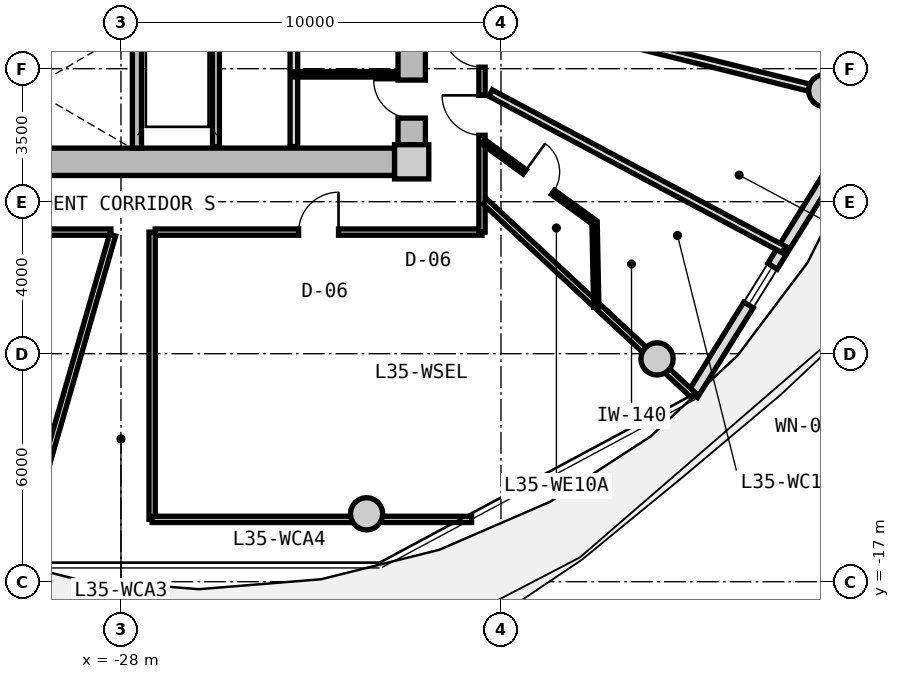
"""IFC4 building model, lengths in metres.
Left out: names, types, materials, properties, quantities, classifications, styles, units other than length and angle.
Written with IfcOpenShell. Run it as: python <this file> out.ifc"""

import sys

from ifc_helpers import new_model, si_unit, direction, frame, frame_2d, origin, origin_2d, place, context, subcontext, project, spatial, rectangle, circle, extrude, source, transform, mapped, element, fill, save


model = new_model("IFC4")
c1 = context("Model", 3, precision=1e-05, world=origin(), true_north=direction((0.0, 1.0)))
c2 = subcontext(c1, "Body", "Model", "MODEL_VIEW")
j1 = project(units=[si_unit("LENGTHUNIT", "METRE"), si_unit("PLANEANGLEUNIT", "RADIAN")], contexts=[c1])
p1 = place(None, origin())
s1 = spatial("IfcSite", under=j1, at=p1, CompositionType="ELEMENT")
p2 = place(p1, origin())
s2 = spatial("IfcBuilding", under=s1, at=p2, CompositionType="ELEMENT")
p3 = place(p2, frame((0.0, 0.0, 114.55)))
s3 = spatial("IfcBuildingStorey", under=s2, at=p3, CompositionType="ELEMENT", Elevation=114.55)
m1 = source(origin(), c2, "Body", "SweptSolid", [
    extrude(rectangle(XDim=0.9, YDim=0.9, at=origin_2d()), origin(), (0.0, 0.0, 1.0), 3.05),
])
p4 = place(p3, frame((-20.35, -5.95, 0.0), z_axis=(0.0, 0.0, 1.0), x_axis=(1.0, 0.0, 0.0)))
e1 = element("IfcColumn", 1, at=p4, inside=s3, PredefinedType="COLUMN", context=c2, shape_type="MappedRepresentation", body=[
    mapped(m1, transform((0.0, 0.0, 0.0), x_axis=(1.0, 0.0, 0.0), y_axis=(0.0, 1.0, 0.0), z_axis=(0.0, 0.0, 1.0), scale=1.0)),
])
m2 = source(origin(), c2, "Body", "SweptSolid", [
    extrude(rectangle(XDim=14.4, YDim=0.72, at=frame_2d((7.2, 0.0))), origin(), (0.0, 0.0, 1.0), 2.79),
])
p5 = place(p3, frame((-20.8, -5.95, 0.0), z_axis=(0.0, 0.0, 1.0), x_axis=(-1.0, 0.0, 0.0)))
e2 = element("IfcWall", 2, at=p5, inside=s3, PredefinedType="SHEAR", context=c2, shape_type="MappedRepresentation", body=[
    mapped(m2, transform((0.0, 0.0, 0.0), x_axis=(1.0, 0.0, 0.0), y_axis=(0.0, 1.0, 0.0), z_axis=(0.0, 0.0, 1.0), scale=1.0)),
])
m3 = source(origin(), c2, "Body", "SweptSolid", [
    extrude(rectangle(XDim=11.0, YDim=0.72, at=frame_2d((5.5, 0.0))), origin(), (0.0, 0.0, 1.0), 2.79),
])
p6 = place(p3, frame((-20.35, 5.5, 0.0), z_axis=(0.0, 0.0, 1.0), x_axis=(0.0, -1.0, 0.0)))
e3 = element("IfcWall", 3, at=p6, inside=s3, PredefinedType="SHEAR", context=c2, shape_type="MappedRepresentation", body=[
    mapped(m3, transform((0.0, 0.0, 0.0), x_axis=(1.0, 0.0, 0.0), y_axis=(0.0, 1.0, 0.0), z_axis=(0.0, 0.0, 1.0), scale=1.0)),
])
p7 = place(p6, frame((5.65, 0.0, 0.0)))
e4 = element("IfcOpeningElement", 4, at=p7, cuts=e3, PredefinedType="OPENING", context=c2, shape_type="SweptSolid", body=[
    extrude(rectangle(XDim=1.2, YDim=2.15, at=frame_2d((0.6, 1.075))), frame((0.0, 0.37, 0.0), z_axis=(0.0, -1.0, 0.0), x_axis=(1.0, 0.0, 0.0)), (0.0, 0.0, 1.0), 0.74),
])
p8 = place(p6, frame((9.3, 0.0, 0.0)))
e5 = element("IfcOpeningElement", 5, at=p8, cuts=e3, PredefinedType="OPENING", context=c2, shape_type="SweptSolid", body=[
    extrude(rectangle(XDim=1.0, YDim=2.1, at=frame_2d((0.5, 1.05))), frame((0.0, 0.37, 0.0), z_axis=(0.0, -1.0, 0.0), x_axis=(1.0, 0.0, 0.0)), (0.0, 0.0, 1.0), 0.74),
])
m4 = source(origin(), c2, "Body", "SweptSolid", [
    extrude(circle(Radius=0.425, at=origin_2d()), origin(), (0.0, 0.0, 1.0), 3.05),
])
for number, where, z_axis, x_axis in (
    (6, (-21.537, -15.213, 0.0), (0.0, 0.0, 1.0), (1.0, 0.0, 0.0)),
    (7, (-13.894, -11.137, 0.0), (0.0, 0.0, 1.0), (1.0, 0.0, 0.0)),
    (8, (-9.481, -4.076, 0.0), (0.0, 0.0, 1.0), (1.0, 0.0, 0.0)),
):
    element("IfcColumn", number, at=place(p3, frame(where, z_axis=z_axis, x_axis=x_axis)), inside=s3, PredefinedType="COLUMN", context=c2, shape_type="MappedRepresentation", body=[
        mapped(m4, transform((0.0, 0.0, 0.0), x_axis=(1.0, 0.0, 0.0), y_axis=(0.0, 1.0, 0.0), z_axis=(0.0, 0.0, 1.0), scale=1.0)),
    ])
m5 = source(origin(), c2, "Body", "SweptSolid", [
    extrude(rectangle(XDim=9.014, YDim=0.29, at=frame_2d((4.507, 0.0))), origin(), (0.0, 0.0, 1.0), 2.79),
])
p9 = place(p3, frame((-8.196, -4.421, 0.0), z_axis=(0.0, 0.0, 1.0), x_axis=(-0.527732945084, -0.849410347637, 0.0)))
e9 = element("IfcWall", 9, at=p9, inside=s3, PredefinedType="SOLIDWALL", context=c2, shape_type="MappedRepresentation", body=[
    mapped(m5, transform((0.0, 0.0, 0.0), x_axis=(1.0, 0.0, 0.0), y_axis=(0.0, 1.0, 0.0), z_axis=(0.0, 0.0, 1.0), scale=1.0)),
])
p10 = place(p9, frame((0.98, 0.0, 0.0)))
e10 = element("IfcOpeningElement", 10, at=p10, cuts=e9, PredefinedType="OPENING", context=c2, shape_type="SweptSolid", body=[
    extrude(rectangle(XDim=1.15, YDim=2.25, at=frame_2d((0.575, 1.125))), frame((0.0, 0.155, 0.0), z_axis=(0.0, -1.0, 0.0), x_axis=(1.0, 0.0, 0.0)), (0.0, 0.0, 1.0), 0.31),
])
p11 = place(p9, frame((5.037, 0.0, 0.85)))
e11 = element("IfcOpeningElement", 11, at=p11, cuts=e9, PredefinedType="OPENING", context=c2, shape_type="SweptSolid", body=[
    extrude(rectangle(XDim=1.2, YDim=1.5, at=frame_2d((0.6, 0.75))), frame((0.0, 0.155, 0.0), z_axis=(0.0, -1.0, 0.0), x_axis=(1.0, 0.0, 0.0)), (0.0, 0.0, 1.0), 0.31),
])
m6 = source(origin(), c2, "Body", "SweptSolid", [
    extrude(rectangle(XDim=3.14, YDim=0.24, at=frame_2d((1.57, 0.0))), origin(), (0.0, 0.0, 1.0), 2.79),
])
p12 = place(p3, frame((-27.58, -5.59, 0.0), z_axis=(0.0, 0.0, 1.0), x_axis=(0.0, 1.0, 0.0)))
e12 = element("IfcWall", 12, at=p12, inside=s3, PredefinedType="PARTITIONING", context=c2, shape_type="MappedRepresentation", body=[
    mapped(m6, transform((0.0, 0.0, 0.0), x_axis=(1.0, 0.0, 0.0), y_axis=(0.0, 1.0, 0.0), z_axis=(0.0, 0.0, 1.0), scale=1.0)),
])
m7 = source(origin(), c2, "Body", "SweptSolid", [
    extrude(rectangle(XDim=3.8, YDim=0.2, at=frame_2d((1.9, 0.0))), origin(), (0.0, 0.0, 1.0), 2.775),
])
p13 = place(p3, frame((-23.45, -5.55, 0.0), z_axis=(0.0, 0.0, 1.0), x_axis=(0.0, 1.0, 0.0)))
e13 = element("IfcWall", 13, at=p13, inside=s3, PredefinedType="PARTITIONING", context=c2, shape_type="MappedRepresentation", body=[
    mapped(m7, transform((0.0, 0.0, 0.0), x_axis=(1.0, 0.0, 0.0), y_axis=(0.0, 1.0, 0.0), z_axis=(0.0, 0.0, 1.0), scale=1.0)),
])
m8 = source(origin(), c2, "Body", "SweptSolid", [
    extrude(rectangle(XDim=3.22, YDim=0.18, at=frame_2d((1.61, 0.0))), origin(), (0.0, 0.0, 1.0), 2.775),
])
p14 = place(p3, frame((-25.5, -5.55, 0.0), z_axis=(0.0, 0.0, 1.0), x_axis=(0.0, 1.0, 0.0)))
e14 = element("IfcWall", 14, at=p14, inside=s3, PredefinedType="PARTITIONING", context=c2, shape_type="MappedRepresentation", body=[
    mapped(m8, transform((0.0, 0.0, 0.0), x_axis=(1.0, 0.0, 0.0), y_axis=(0.0, 1.0, 0.0), z_axis=(0.0, 0.0, 1.0), scale=1.0)),
])
m9 = source(origin(), c2, "Body", "SweptSolid", [
    extrude(rectangle(XDim=2.7, YDim=0.14, at=frame_2d((1.35, 0.0))), origin(), (0.0, 0.0, 1.0), 2.775),
])
p15 = place(p3, frame((-23.45, -3.65, 0.0), z_axis=(0.0, 0.0, 1.0), x_axis=(1.0, 0.0, 0.0)))
e15 = element("IfcWall", 15, at=p15, inside=s3, PredefinedType="PARTITIONING", context=c2, shape_type="MappedRepresentation", body=[
    mapped(m9, transform((0.0, 0.0, 0.0), x_axis=(1.0, 0.0, 0.0), y_axis=(0.0, 1.0, 0.0), z_axis=(0.0, 0.0, 1.0), scale=1.0)),
])
m10 = source(origin(), c2, "Body", "SweptSolid", [
    extrude(rectangle(XDim=8.6, YDim=0.165, at=frame_2d((4.3, 0.0))), origin(), (0.0, 0.0, 1.0), 2.775),
])
p16 = place(p3, frame((-18.5, -7.8, 0.0), z_axis=(0.0, 0.0, 1.0), x_axis=(-1.0, 0.0, 0.0)))
e16 = element("IfcWall", 16, at=p16, inside=s3, PredefinedType="PARTITIONING", context=c2, shape_type="MappedRepresentation", body=[
    mapped(m10, transform((0.0, 0.0, 0.0), x_axis=(1.0, 0.0, 0.0), y_axis=(0.0, 1.0, 0.0), z_axis=(0.0, 0.0, 1.0), scale=1.0)),
])
p17 = place(p16, frame((3.775, 0.0, 0.0)))
e17 = element("IfcOpeningElement", 17, at=p17, cuts=e16, PredefinedType="OPENING", context=c2, shape_type="SweptSolid", body=[
    extrude(rectangle(XDim=1.05, YDim=2.15, at=frame_2d((0.525, 1.075))), frame((0.0, 0.093, 0.0), z_axis=(0.0, -1.0, 0.0), x_axis=(1.0, 0.0, 0.0)), (0.0, 0.0, 1.0), 0.185),
])
m11 = source(origin(), c2, "Body", "SweptSolid", [
    extrude(rectangle(XDim=9.234, YDim=0.165, at=frame_2d((4.617, 0.0))), origin(), (0.0, 0.0, 1.0), 2.775),
])
p18 = place(p3, frame((-28.266, -7.8, 0.0), z_axis=(0.0, 0.0, 1.0), x_axis=(-1.0, 0.0, 0.0)))
e18 = element("IfcWall", 18, at=p18, inside=s3, PredefinedType="PARTITIONING", context=c2, shape_type="MappedRepresentation", body=[
    mapped(m11, transform((0.0, 0.0, 0.0), x_axis=(1.0, 0.0, 0.0), y_axis=(0.0, 1.0, 0.0), z_axis=(0.0, 0.0, 1.0), scale=1.0)),
])
m12 = source(origin(), c2, "Body", "SweptSolid", [
    extrude(rectangle(XDim=15.6, YDim=0.165, at=frame_2d((7.8, 0.0))), origin(), (0.0, 0.0, 1.0), 2.775),
])
p19 = place(p3, frame((-18.5, 7.8, 0.0), z_axis=(0.0, 0.0, 1.0), x_axis=(0.0, -1.0, 0.0)))
e19 = element("IfcWall", 19, at=p19, inside=s3, PredefinedType="PARTITIONING", context=c2, shape_type="MappedRepresentation", body=[
    mapped(m12, transform((0.0, 0.0, 0.0), x_axis=(1.0, 0.0, 0.0), y_axis=(0.0, 1.0, 0.0), z_axis=(0.0, 0.0, 1.0), scale=1.0)),
])
p20 = place(p19, frame((12.002, 0.0, 0.0)))
e20 = element("IfcOpeningElement", 20, at=p20, cuts=e19, PredefinedType="OPENING", context=c2, shape_type="SweptSolid", body=[
    extrude(rectangle(XDim=1.05, YDim=2.15, at=frame_2d((0.525, 1.075))), frame((0.0, 0.093, 0.0), z_axis=(0.0, -1.0, 0.0), x_axis=(1.0, 0.0, 0.0)), (0.0, 0.0, 1.0), 0.185),
])
p21 = place(p19, frame((10.211, 0.0, 0.0)))
e21 = element("IfcOpeningElement", 21, at=p21, cuts=e19, PredefinedType="OPENING", context=c2, shape_type="SweptSolid", body=[
    extrude(rectangle(XDim=1.05, YDim=2.15, at=frame_2d((0.525, 1.075))), frame((0.0, 0.093, 0.0), z_axis=(0.0, -1.0, 0.0), x_axis=(1.0, 0.0, 0.0)), (0.0, 0.0, 1.0), 0.185),
])
p22 = place(p19, frame((8.212, 0.0, 0.0)))
e22 = element("IfcOpeningElement", 22, at=p22, cuts=e19, PredefinedType="OPENING", context=c2, shape_type="SweptSolid", body=[
    extrude(rectangle(XDim=1.05, YDim=2.15, at=frame_2d((0.525, 1.075))), frame((0.0, 0.093, 0.0), z_axis=(0.0, -1.0, 0.0), x_axis=(1.0, 0.0, 0.0)), (0.0, 0.0, 1.0), 0.185),
])
p23 = place(p19, frame((6.291, 0.0, 0.0)))
e23 = element("IfcOpeningElement", 23, at=p23, cuts=e19, PredefinedType="OPENING", context=c2, shape_type="SweptSolid", body=[
    extrude(rectangle(XDim=1.05, YDim=2.15, at=frame_2d((0.525, 1.075))), frame((0.0, 0.093, 0.0), z_axis=(0.0, -1.0, 0.0), x_axis=(1.0, 0.0, 0.0)), (0.0, 0.0, 1.0), 0.185),
])
p24 = place(p19, frame((4.739, 0.0, 0.0)))
e24 = element("IfcOpeningElement", 24, at=p24, cuts=e19, PredefinedType="OPENING", context=c2, shape_type="SweptSolid", body=[
    extrude(rectangle(XDim=0.92, YDim=2.1, at=frame_2d((0.46, 1.05))), frame((0.0, 0.093, 0.0), z_axis=(0.0, -1.0, 0.0), x_axis=(1.0, 0.0, 0.0)), (0.0, 0.0, 1.0), 0.185),
])
p25 = place(p19, frame((2.096, 0.0, 0.0)))
e25 = element("IfcOpeningElement", 25, at=p25, cuts=e19, PredefinedType="OPENING", context=c2, shape_type="SweptSolid", body=[
    extrude(rectangle(XDim=0.92, YDim=2.1, at=frame_2d((0.46, 1.05))), frame((0.0, 0.093, 0.0), z_axis=(0.0, -1.0, 0.0), x_axis=(1.0, 0.0, 0.0)), (0.0, 0.0, 1.0), 0.185),
])
m13 = source(origin(), c2, "Body", "SweptSolid", [
    extrude(rectangle(XDim=8.989, YDim=0.165, at=frame_2d((4.495, 0.0))), origin(), (0.0, 0.0, 1.0), 2.275),
])
p26 = place(p3, frame((-28.222, -7.88, 0.0), z_axis=(0.0, 0.0, 1.0), x_axis=(-0.27702323008, -0.960863221274, 0.0)))
e26 = element("IfcWall", 26, at=p26, inside=s3, PredefinedType="PARTITIONING", context=c2, shape_type="MappedRepresentation", body=[
    mapped(m13, transform((0.0, 0.0, 0.0), x_axis=(1.0, 0.0, 0.0), y_axis=(0.0, 1.0, 0.0), z_axis=(0.0, 0.0, 1.0), scale=1.0)),
])
m14 = source(origin(), c2, "Body", "SweptSolid", [
    extrude(rectangle(XDim=7.482, YDim=0.165, at=frame_2d((3.741, 0.0))), origin(), (0.0, 0.0, 1.0), 2.275),
])
p27 = place(p3, frame((-18.42, -6.998, 0.0), z_axis=(0.0, 0.0, 1.0), x_axis=(0.732508698043, -0.680757671489, 0.0)))
e27 = element("IfcWall", 27, at=p27, inside=s3, PredefinedType="PARTITIONING", context=c2, shape_type="MappedRepresentation", body=[
    mapped(m14, transform((0.0, 0.0, 0.0), x_axis=(1.0, 0.0, 0.0), y_axis=(0.0, 1.0, 0.0), z_axis=(0.0, 0.0, 1.0), scale=1.0)),
])
m15 = source(origin(), c2, "Body", "SweptSolid", [
    extrude(rectangle(XDim=7.56, YDim=0.165, at=frame_2d((3.78, 0.0))), origin(), (0.0, 0.0, 1.0), 2.775),
])
p28 = place(p3, frame((-27.18, -15.36, 0.0), z_axis=(0.0, 0.0, 1.0), x_axis=(0.0, 1.0, 0.0)))
e28 = element("IfcWall", 28, at=p28, inside=s3, PredefinedType="PARTITIONING", context=c2, shape_type="MappedRepresentation", body=[
    mapped(m15, transform((0.0, 0.0, 0.0), x_axis=(1.0, 0.0, 0.0), y_axis=(0.0, 1.0, 0.0), z_axis=(0.0, 0.0, 1.0), scale=1.0)),
])
m16 = source(origin(), c2, "Body", "SweptSolid", [
    extrude(rectangle(XDim=8.407, YDim=0.165, at=frame_2d((4.204, 0.0))), origin(), (0.0, 0.0, 1.0), 2.275),
])
p29 = place(p3, frame((-27.18, -15.36, 0.0), z_axis=(0.0, 0.0, 1.0), x_axis=(1.0, 0.0, 0.0)))
e29 = element("IfcWall", 29, at=p29, inside=s3, PredefinedType="PARTITIONING", context=c2, shape_type="MappedRepresentation", body=[
    mapped(m16, transform((0.0, 0.0, 0.0), x_axis=(1.0, 0.0, 0.0), y_axis=(0.0, 1.0, 0.0), z_axis=(0.0, 0.0, 1.0), scale=1.0)),
])
m17 = source(origin(), c2, "Body", "SweptSolid", [
    extrude(rectangle(XDim=10.556, YDim=0.19, at=frame_2d((5.278, 0.0))), origin(), (0.0, 0.0, 1.0), 2.275),
])
p30 = place(p3, frame((-18.42, -1.875, 0.0), z_axis=(0.0, 0.0, 1.0), x_axis=(0.970363857851, -0.241648470667, 0.0)))
e30 = element("IfcWall", 30, at=p30, inside=s3, PredefinedType="PARTITIONING", context=c2, shape_type="MappedRepresentation", body=[
    mapped(m17, transform((0.0, 0.0, 0.0), x_axis=(1.0, 0.0, 0.0), y_axis=(0.0, 1.0, 0.0), z_axis=(0.0, 0.0, 1.0), scale=1.0)),
])
m18 = source(origin(), c2, "Body", "SweptSolid", [
    extrude(rectangle(XDim=8.744, YDim=0.19, at=frame_2d((4.372, 0.0))), origin(), (0.0, 0.0, 1.0), 2.775),
])
p31 = place(p3, frame((-18.273, -4.142, 0.0), z_axis=(0.0, 0.0, 1.0), x_axis=(0.882252449936, -0.470776607938, 0.0)))
e31 = element("IfcWall", 31, at=p31, inside=s3, PredefinedType="PARTITIONING", context=c2, shape_type="MappedRepresentation", body=[
    mapped(m18, transform((0.0, 0.0, 0.0), x_axis=(1.0, 0.0, 0.0), y_axis=(0.0, 1.0, 0.0), z_axis=(0.0, 0.0, 1.0), scale=1.0)),
])
m19 = source(origin(), c2, "Body", "SweptSolid", [
    extrude(rectangle(XDim=3.621, YDim=0.14, at=frame_2d((1.811, 0.0))), origin(), (0.0, 0.0, 1.0), 2.775),
])
p32 = place(p3, frame((-18.47, -5.422, 0.0), z_axis=(0.0, 0.0, 1.0), x_axis=(0.80968252222, -0.586868139544, 0.0)))
e32 = element("IfcWall", 32, at=p32, inside=s3, PredefinedType="PARTITIONING", context=c2, shape_type="MappedRepresentation", body=[
    mapped(m19, transform((0.0, 0.0, 0.0), x_axis=(1.0, 0.0, 0.0), y_axis=(0.0, 1.0, 0.0), z_axis=(0.0, 0.0, 1.0), scale=1.0)),
])
p33 = place(p32, frame((1.351, 0.0, 0.0)))
e33 = element("IfcOpeningElement", 33, at=p33, cuts=e32, PredefinedType="OPENING", context=c2, shape_type="SweptSolid", body=[
    extrude(rectangle(XDim=0.92, YDim=2.1, at=frame_2d((0.46, 1.05))), frame((0.0, 0.08, 0.0), z_axis=(0.0, -1.0, 0.0), x_axis=(1.0, 0.0, 0.0)), (0.0, 0.0, 1.0), 0.16),
])
m20 = source(origin(), c2, "Body", "SweptSolid", [
    extrude(rectangle(XDim=2.225, YDim=0.14, at=frame_2d((1.112, 0.0))), origin(), (0.0, 0.0, 1.0), 2.775),
])
p34 = place(p3, frame((-15.538, -7.547, 0.0), z_axis=(0.0, 0.0, 1.0), x_axis=(0.019971869027, -0.999800542332, 0.0)))
e34 = element("IfcWall", 34, at=p34, inside=s3, PredefinedType="PARTITIONING", context=c2, shape_type="MappedRepresentation", body=[
    mapped(m20, transform((0.0, 0.0, 0.0), x_axis=(1.0, 0.0, 0.0), y_axis=(0.0, 1.0, 0.0), z_axis=(0.0, 0.0, 1.0), scale=1.0)),
])
m21 = source(origin(), c2, "Body", "SweptSolid", [
    extrude(rectangle(XDim=1.2, YDim=1.5, at=frame_2d((0.6, 0.75))), frame((0.0, 0.03, 0.0), z_axis=(0.0, -1.0, 0.0), x_axis=(1.0, 0.0, 0.0)), (0.0, 0.0, 1.0), 0.06),
])
p35 = place(p11, origin())
e35 = element("IfcWindow", 35, at=p35, inside=s3, PartitioningType="SINGLE_PANEL", PredefinedType="WINDOW", context=c2, shape_type="MappedRepresentation", body=[
    mapped(m21, transform((0.0, 0.0, 0.0), x_axis=(1.0, 0.0, 0.0), y_axis=(0.0, 1.0, 0.0), z_axis=(0.0, 0.0, 1.0), scale=1.0)),
])
fill(e11, e35)
m22 = source(origin(), c2, "Body", "SweptSolid", [
    extrude(rectangle(XDim=1.0, YDim=2.1, at=frame_2d((0.5, 1.05))), frame((0.0, 0.025, 0.0), z_axis=(0.0, -1.0, 0.0), x_axis=(1.0, 0.0, 0.0)), (0.0, 0.0, 1.0), 0.05),
])
p36 = place(p8, frame((1.0, 0.0, 0.0), z_axis=(0.0, 0.0, 1.0), x_axis=(-1.0, 0.0, 0.0)))
e36 = element("IfcDoor", 36, at=p36, inside=s3, OperationType="SINGLE_SWING_RIGHT", PredefinedType="DOOR", context=c2, shape_type="MappedRepresentation", body=[
    mapped(m22, transform((0.0, 0.0, 0.0), x_axis=(1.0, 0.0, 0.0), y_axis=(0.0, 1.0, 0.0), z_axis=(0.0, 0.0, 1.0), scale=1.0)),
])
fill(e5, e36)
m23 = source(origin(), c2, "Body", "SweptSolid", [
    extrude(rectangle(XDim=1.05, YDim=2.15, at=frame_2d((0.525, 1.075))), frame((0.0, 0.025, 0.0), z_axis=(0.0, -1.0, 0.0), x_axis=(1.0, 0.0, 0.0)), (0.0, 0.0, 1.0), 0.05),
])
p37 = place(p17, frame((1.05, 0.0, 0.0), z_axis=(0.0, 0.0, 1.0), x_axis=(-1.0, 0.0, 0.0)))
e37 = element("IfcDoor", 37, at=p37, inside=s3, OperationType="SINGLE_SWING_RIGHT", PredefinedType="DOOR", context=c2, shape_type="MappedRepresentation", body=[
    mapped(m23, transform((0.0, 0.0, 0.0), x_axis=(1.0, 0.0, 0.0), y_axis=(0.0, 1.0, 0.0), z_axis=(0.0, 0.0, 1.0), scale=1.0)),
])
fill(e17, e37)
p38 = place(p20, frame((1.05, 0.0, 0.0), z_axis=(0.0, 0.0, 1.0), x_axis=(-1.0, 0.0, 0.0)))
e38 = element("IfcDoor", 38, at=p38, inside=s3, OperationType="SINGLE_SWING_RIGHT", PredefinedType="DOOR", context=c2, shape_type="MappedRepresentation", body=[
    mapped(m23, transform((0.0, 0.0, 0.0), x_axis=(1.0, 0.0, 0.0), y_axis=(0.0, 1.0, 0.0), z_axis=(0.0, 0.0, 1.0), scale=1.0)),
])
fill(e20, e38)
m24 = source(origin(), c2, "Body", "SweptSolid", [
    extrude(rectangle(XDim=0.92, YDim=2.1, at=frame_2d((0.46, 1.05))), frame((0.0, 0.025, 0.0), z_axis=(0.0, -1.0, 0.0), x_axis=(1.0, 0.0, 0.0)), (0.0, 0.0, 1.0), 0.05),
])
p39 = place(p33, origin())
e39 = element("IfcDoor", 39, at=p39, inside=s3, OperationType="SINGLE_SWING_LEFT", PredefinedType="DOOR", context=c2, shape_type="MappedRepresentation", body=[
    mapped(m24, transform((0.0, 0.0, 0.0), x_axis=(1.0, 0.0, 0.0), y_axis=(0.0, 1.0, 0.0), z_axis=(0.0, 0.0, 1.0), scale=1.0)),
])
fill(e33, e39)
p40 = place(p21, frame((1.05, 0.0, 0.0), z_axis=(0.0, 0.0, 1.0), x_axis=(-1.0, 0.0, 0.0)))
e40 = element("IfcDoor", 40, at=p40, inside=s3, OperationType="SINGLE_SWING_RIGHT", PredefinedType="DOOR", context=c2, shape_type="MappedRepresentation", body=[
    mapped(m23, transform((0.0, 0.0, 0.0), x_axis=(1.0, 0.0, 0.0), y_axis=(0.0, 1.0, 0.0), z_axis=(0.0, 0.0, 1.0), scale=1.0)),
])
fill(e21, e40)
save(model, sys.argv[1])
